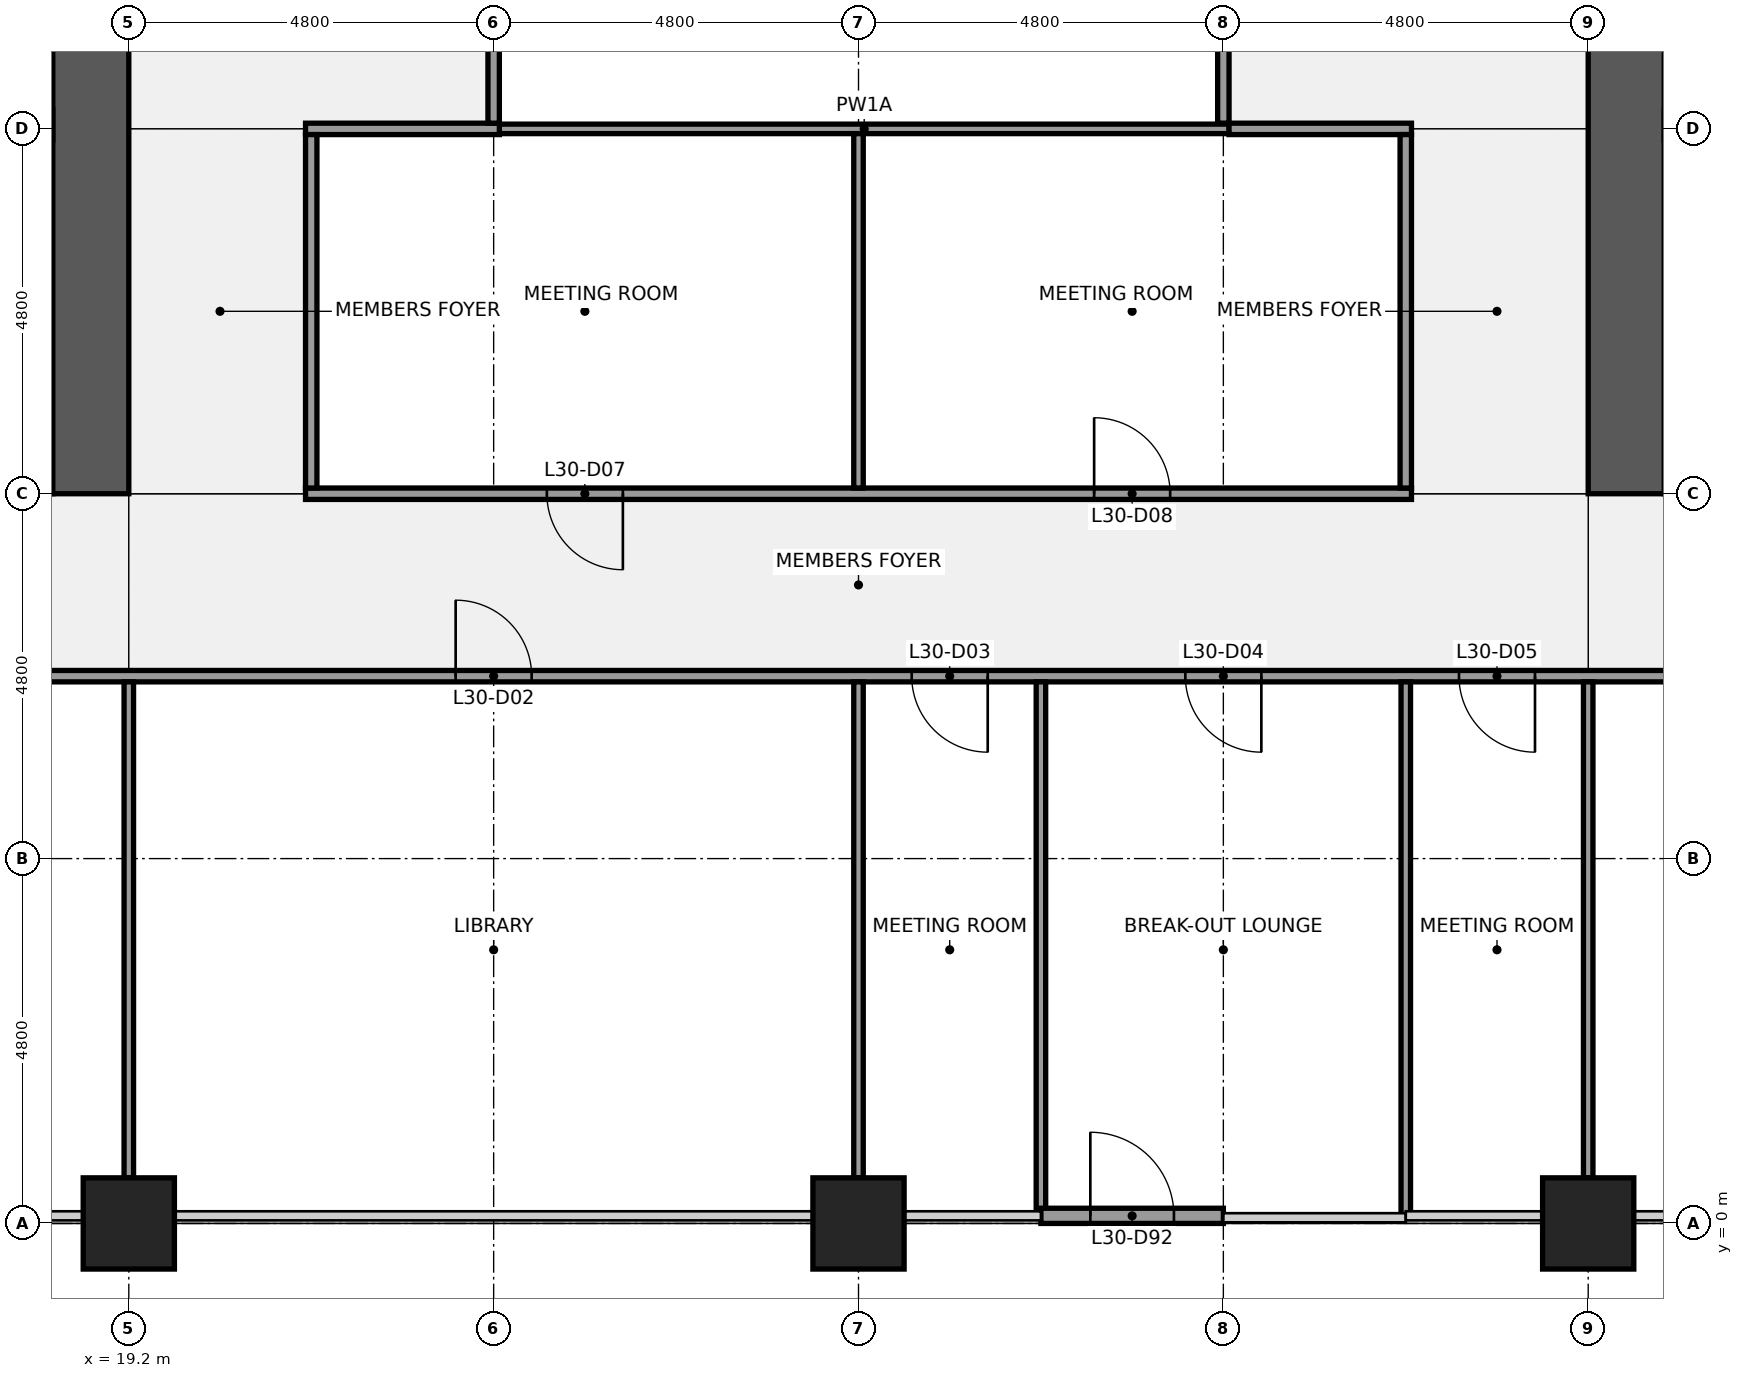
"""IFC4 building model, lengths in metres.
Left out: names, types, materials, properties, quantities, classifications, styles, units other than length and angle.
Written with IfcOpenShell. Run it as: python <this file> out.ifc"""

import sys

from ifc_helpers import new_model, si_unit, direction, frame, frame_2d, origin, origin_2d, place, context, subcontext, project, spatial, rectangle, extrude, element, fill, save


model = new_model("IFC4")
c1 = context("Model", 3, precision=1e-05, world=origin(), true_north=direction((0.0, 1.0)))
c2 = subcontext(c1, "Body", "Model", "MODEL_VIEW")
j1 = project(units=[si_unit("LENGTHUNIT", "METRE"), si_unit("PLANEANGLEUNIT", "RADIAN")], contexts=[c1])
p1 = place(None, origin())
s1 = spatial("IfcSite", under=j1, at=p1, CompositionType="ELEMENT")
p2 = place(p1, origin())
s2 = spatial("IfcBuilding", under=s1, at=p2, CompositionType="ELEMENT")
p3 = place(p2, frame((0.0, 0.0, 140.1)))
s3 = spatial("IfcBuildingStorey", under=s2, at=p3, CompositionType="ELEMENT", Elevation=140.1)
for number, where, z_axis, x_axis in (
    (1, (19.2, 0.0, 0.0), (0.0, 0.0, 1.0), (1.0, 0.0, 0.0)),
    (2, (28.8, 0.0, 0.0), (0.0, 0.0, 1.0), (1.0, 0.0, 0.0)),
    (3, (38.4, 0.0, 0.0), (0.0, 0.0, 1.0), (1.0, 0.0, 0.0)),
):
    element("IfcColumn", number, at=place(p3, frame(where, z_axis=z_axis, x_axis=x_axis)), inside=s3, PredefinedType="COLUMN", context=c2, shape_type="SweptSolid", body=[
        extrude(rectangle(XDim=1.2, YDim=1.2, at=origin_2d()), origin(), (0.0, 0.0, 1.0), 4.0),
    ])
p4 = place(p3, frame((18.2, 10.1, 0.0), z_axis=(0.0, 0.0, 1.0), x_axis=(-1.0, 0.0, 0.0)))
e4 = element("IfcWall", 4, at=p4, inside=s3, PredefinedType="SHEAR", context=c2, shape_type="SweptSolid", body=[
    extrude(rectangle(XDim=8.6, YDim=1.0, at=frame_2d((4.3, 0.0))), origin(), (0.0, 0.0, 1.0), 3.84),
])
p5 = place(p4, frame((0.85, 0.0, 0.0)))
e5 = element("IfcOpeningElement", 5, at=p5, cuts=e4, PredefinedType="OPENING", context=c2, shape_type="SweptSolid", body=[
    extrude(rectangle(XDim=1.1, YDim=2.1, at=frame_2d((0.55, 1.05))), frame((0.0, 0.51, 0.0), z_axis=(0.0, -1.0, 0.0), x_axis=(1.0, 0.0, 0.0)), (0.0, 0.0, 1.0), 1.02),
])
p6 = place(p3, frame((18.7, 38.4, 0.0), z_axis=(0.0, 0.0, 1.0), x_axis=(0.0, -1.0, 0.0)))
e6 = element("IfcWall", 6, at=p6, inside=s3, PredefinedType="SHEAR", context=c2, shape_type="SweptSolid", body=[
    extrude(rectangle(XDim=28.8, YDim=1.0, at=frame_2d((14.4, 0.0))), origin(), (0.0, 0.0, 1.0), 3.84),
])
p7 = place(p6, frame((18.3, 0.0, 0.0)))
e7 = element("IfcOpeningElement", 7, at=p7, cuts=e6, PredefinedType="OPENING", context=c2, shape_type="SweptSolid", body=[
    extrude(rectangle(XDim=1.8, YDim=2.1, at=frame_2d((0.9, 1.05))), frame((0.0, 0.51, 0.0), z_axis=(0.0, -1.0, 0.0), x_axis=(1.0, 0.0, 0.0)), (0.0, 0.0, 1.0), 1.02),
])
p8 = place(p6, frame((8.7, 0.0, 0.0)))
e8 = element("IfcOpeningElement", 8, at=p8, cuts=e6, PredefinedType="OPENING", context=c2, shape_type="SweptSolid", body=[
    extrude(rectangle(XDim=1.8, YDim=2.1, at=frame_2d((0.9, 1.05))), frame((0.0, 0.51, 0.0), z_axis=(0.0, -1.0, 0.0), x_axis=(1.0, 0.0, 0.0)), (0.0, 0.0, 1.0), 1.02),
])
p9 = place(p3, frame((1.0, 14.45, 0.0), z_axis=(0.0, 0.0, 1.0), x_axis=(1.0, 0.0, 0.0)))
e9 = element("IfcWall", 9, at=p9, inside=s3, PredefinedType="SHEAR", context=c2, shape_type="SweptSolid", body=[
    extrude(rectangle(XDim=17.2, YDim=0.4, at=frame_2d((8.6, 0.0))), origin(), (0.0, 0.0, 1.0), 3.84),
])
p10 = place(p3, frame((38.9, 9.6, 0.0), z_axis=(0.0, 0.0, 1.0), x_axis=(0.0, 1.0, 0.0)))
e10 = element("IfcWall", 10, at=p10, inside=s3, PredefinedType="SHEAR", context=c2, shape_type="SweptSolid", body=[
    extrude(rectangle(XDim=28.8, YDim=1.0, at=frame_2d((14.4, 0.0))), origin(), (0.0, 0.0, 1.0), 3.84),
])
p11 = place(p10, frame((8.7, 0.0, 0.0)))
e11 = element("IfcOpeningElement", 11, at=p11, cuts=e10, PredefinedType="OPENING", context=c2, shape_type="SweptSolid", body=[
    extrude(rectangle(XDim=1.8, YDim=2.1, at=frame_2d((0.9, 1.05))), frame((0.0, 0.51, 0.0), z_axis=(0.0, -1.0, 0.0), x_axis=(1.0, 0.0, 0.0)), (0.0, 0.0, 1.0), 1.02),
])
p12 = place(p10, frame((18.3, 0.0, 0.0)))
e12 = element("IfcOpeningElement", 12, at=p12, cuts=e10, PredefinedType="OPENING", context=c2, shape_type="SweptSolid", body=[
    extrude(rectangle(XDim=1.8, YDim=2.1, at=frame_2d((0.9, 1.05))), frame((0.0, 0.51, 0.0), z_axis=(0.0, -1.0, 0.0), x_axis=(1.0, 0.0, 0.0)), (0.0, 0.0, 1.0), 1.02),
])
p13 = place(p3, frame((9.7, 7.2, 0.0), z_axis=(0.0, 0.0, 1.0), x_axis=(1.0, 0.0, 0.0)))
e13 = element("IfcWall", 13, at=p13, inside=s3, PredefinedType="PARTITIONING", context=c2, shape_type="SweptSolid", body=[
    extrude(rectangle(XDim=38.2, YDim=0.15, at=frame_2d((19.1, 0.0))), origin(), (0.0, 0.0, 1.0), 2.936),
])
p14 = place(p13, frame((0.65, 0.0, 0.0)))
e14 = element("IfcOpeningElement", 14, at=p14, cuts=e13, PredefinedType="OPENING", context=c2, shape_type="SweptSolid", body=[
    extrude(rectangle(XDim=1.0, YDim=2.1, at=frame_2d((0.5, 1.05))), frame((0.0, 0.085, 0.0), z_axis=(0.0, -1.0, 0.0), x_axis=(1.0, 0.0, 0.0)), (0.0, 0.0, 1.0), 0.17),
])
p15 = place(p13, frame((13.8, 0.0, 0.0)))
e15 = element("IfcOpeningElement", 15, at=p15, cuts=e13, PredefinedType="OPENING", context=c2, shape_type="SweptSolid", body=[
    extrude(rectangle(XDim=1.0, YDim=2.1, at=frame_2d((0.5, 1.05))), frame((0.0, 0.085, 0.0), z_axis=(0.0, -1.0, 0.0), x_axis=(1.0, 0.0, 0.0)), (0.0, 0.0, 1.0), 0.17),
])
p16 = place(p13, frame((19.8, 0.0, 0.0)))
e16 = element("IfcOpeningElement", 16, at=p16, cuts=e13, PredefinedType="OPENING", context=c2, shape_type="SweptSolid", body=[
    extrude(rectangle(XDim=1.0, YDim=2.1, at=frame_2d((0.5, 1.05))), frame((0.0, 0.085, 0.0), z_axis=(0.0, -1.0, 0.0), x_axis=(1.0, 0.0, 0.0)), (0.0, 0.0, 1.0), 0.17),
])
p17 = place(p13, frame((23.4, 0.0, 0.0)))
e17 = element("IfcOpeningElement", 17, at=p17, cuts=e13, PredefinedType="OPENING", context=c2, shape_type="SweptSolid", body=[
    extrude(rectangle(XDim=1.0, YDim=2.1, at=frame_2d((0.5, 1.05))), frame((0.0, 0.085, 0.0), z_axis=(0.0, -1.0, 0.0), x_axis=(1.0, 0.0, 0.0)), (0.0, 0.0, 1.0), 0.17),
])
p18 = place(p13, frame((27.0, 0.0, 0.0)))
e18 = element("IfcOpeningElement", 18, at=p18, cuts=e13, PredefinedType="OPENING", context=c2, shape_type="SweptSolid", body=[
    extrude(rectangle(XDim=1.0, YDim=2.1, at=frame_2d((0.5, 1.05))), frame((0.0, 0.085, 0.0), z_axis=(0.0, -1.0, 0.0), x_axis=(1.0, 0.0, 0.0)), (0.0, 0.0, 1.0), 0.17),
])
p19 = place(p13, frame((32.95, 0.0, 0.0)))
e19 = element("IfcOpeningElement", 19, at=p19, cuts=e13, PredefinedType="OPENING", context=c2, shape_type="SweptSolid", body=[
    extrude(rectangle(XDim=1.0, YDim=2.1, at=frame_2d((0.5, 1.05))), frame((0.0, 0.085, 0.0), z_axis=(0.0, -1.0, 0.0), x_axis=(1.0, 0.0, 0.0)), (0.0, 0.0, 1.0), 0.17),
])
p20 = place(p3, frame((21.525, 9.6, 0.0), z_axis=(0.0, 0.0, 1.0), x_axis=(1.0, 0.0, 0.0)))
e20 = element("IfcWall", 20, at=p20, inside=s3, PredefinedType="PARTITIONING", context=c2, shape_type="SweptSolid", body=[
    extrude(rectangle(XDim=14.55, YDim=0.15, at=frame_2d((7.275, 0.0))), origin(), (0.0, 0.0, 1.0), 2.936),
])
p21 = place(p20, frame((3.175, 0.0, 0.0)))
e21 = element("IfcOpeningElement", 21, at=p21, cuts=e20, PredefinedType="OPENING", context=c2, shape_type="SweptSolid", body=[
    extrude(rectangle(XDim=1.0, YDim=2.1, at=frame_2d((0.5, 1.05))), frame((0.0, 0.085, 0.0), z_axis=(0.0, -1.0, 0.0), x_axis=(1.0, 0.0, 0.0)), (0.0, 0.0, 1.0), 0.17),
])
p22 = place(p20, frame((10.375, 0.0, 0.0)))
e22 = element("IfcOpeningElement", 22, at=p22, cuts=e20, PredefinedType="OPENING", context=c2, shape_type="SweptSolid", body=[
    extrude(rectangle(XDim=1.0, YDim=2.1, at=frame_2d((0.5, 1.05))), frame((0.0, 0.085, 0.0), z_axis=(0.0, -1.0, 0.0), x_axis=(1.0, 0.0, 0.0)), (0.0, 0.0, 1.0), 0.17),
])
p23 = place(p3, frame((24.075, 14.4, 0.0), z_axis=(0.0, 0.0, 1.0), x_axis=(1.0, 0.0, 0.0)))
e23 = element("IfcWall", 23, at=p23, inside=s3, PredefinedType="PARTITIONING", context=c2, shape_type="SweptSolid", body=[
    extrude(rectangle(XDim=9.6, YDim=0.125, at=frame_2d((4.8, 0.0))), origin(), (0.0, 0.0, 1.0), 2.936),
])
p24 = place(p3, frame((21.525, 14.4, 0.0), z_axis=(0.0, 0.0, 1.0), x_axis=(1.0, 0.0, 0.0)))
e24 = element("IfcWall", 24, at=p24, inside=s3, PredefinedType="PARTITIONING", context=c2, shape_type="SweptSolid", body=[
    extrude(rectangle(XDim=2.55, YDim=0.15, at=frame_2d((1.275, 0.0))), origin(), (0.0, 0.0, 1.0), 2.936),
])
p25 = place(p3, frame((33.675, 14.4, 0.0), z_axis=(0.0, 0.0, 1.0), x_axis=(1.0, 0.0, 0.0)))
e25 = element("IfcWall", 25, at=p25, inside=s3, PredefinedType="PARTITIONING", context=c2, shape_type="SweptSolid", body=[
    extrude(rectangle(XDim=2.4, YDim=0.15, at=frame_2d((1.2, 0.0))), origin(), (0.0, 0.0, 1.0), 2.936),
])
p26 = place(p3, frame((19.2, 0.6, 0.0), z_axis=(0.0, 0.0, 1.0), x_axis=(0.0, 1.0, 0.0)))
e26 = element("IfcWall", 26, at=p26, inside=s3, PredefinedType="PARTITIONING", context=c2, shape_type="SweptSolid", body=[
    extrude(rectangle(XDim=6.525, YDim=0.125, at=frame_2d((3.262, 0.0))), origin(), (0.0, 0.0, 1.0), 2.936),
])
p27 = place(p3, frame((21.6, 9.675, 0.0), z_axis=(0.0, 0.0, 1.0), x_axis=(0.0, 1.0, 0.0)))
e27 = element("IfcWall", 27, at=p27, inside=s3, PredefinedType="PARTITIONING", context=c2, shape_type="SweptSolid", body=[
    extrude(rectangle(XDim=4.65, YDim=0.15, at=frame_2d((2.325, 0.0))), origin(), (0.0, 0.0, 1.0), 2.936),
])
p28 = place(p3, frame((24.0, 14.475, 0.0), z_axis=(0.0, 0.0, 1.0), x_axis=(0.0, 1.0, 0.0)))
e28 = element("IfcWall", 28, at=p28, inside=s3, PredefinedType="PARTITIONING", context=c2, shape_type="SweptSolid", body=[
    extrude(rectangle(XDim=10.65, YDim=0.15, at=frame_2d((5.325, 0.0))), origin(), (0.0, 0.0, 1.0), 2.936),
])
p29 = place(p28, frame((4.825, 0.0, 0.0)))
e29 = element("IfcOpeningElement", 29, at=p29, cuts=e28, PredefinedType="OPENING", context=c2, shape_type="SweptSolid", body=[
    extrude(rectangle(XDim=1.0, YDim=2.1, at=frame_2d((0.5, 1.05))), frame((0.0, 0.085, 0.0), z_axis=(0.0, -1.0, 0.0), x_axis=(1.0, 0.0, 0.0)), (0.0, 0.0, 1.0), 0.17),
])
p30 = place(p3, frame((28.8, 0.6, 0.0), z_axis=(0.0, 0.0, 1.0), x_axis=(0.0, 1.0, 0.0)))
e30 = element("IfcWall", 30, at=p30, inside=s3, PredefinedType="PARTITIONING", context=c2, shape_type="SweptSolid", body=[
    extrude(rectangle(XDim=6.525, YDim=0.125, at=frame_2d((3.262, 0.0))), origin(), (0.0, 0.0, 1.0), 2.936),
])
p31 = place(p3, frame((28.8, 9.675, 0.0), z_axis=(0.0, 0.0, 1.0), x_axis=(0.0, 1.0, 0.0)))
e31 = element("IfcWall", 31, at=p31, inside=s3, PredefinedType="PARTITIONING", context=c2, shape_type="SweptSolid", body=[
    extrude(rectangle(XDim=4.662, YDim=0.125, at=frame_2d((2.331, 0.0))), origin(), (0.0, 0.0, 1.0), 2.936),
])
p32 = place(p3, frame((31.2, 0.1, 0.0), z_axis=(0.0, 0.0, 1.0), x_axis=(0.0, 1.0, 0.0)))
e32 = element("IfcWall", 32, at=p32, inside=s3, PredefinedType="PARTITIONING", context=c2, shape_type="SweptSolid", body=[
    extrude(rectangle(XDim=7.025, YDim=0.125, at=frame_2d((3.512, 0.0))), origin(), (0.0, 0.0, 1.0), 2.936),
])
p33 = place(p3, frame((33.6, 14.475, 0.0), z_axis=(0.0, 0.0, 1.0), x_axis=(0.0, 1.0, 0.0)))
e33 = element("IfcWall", 33, at=p33, inside=s3, PredefinedType="PARTITIONING", context=c2, shape_type="SweptSolid", body=[
    extrude(rectangle(XDim=10.65, YDim=0.15, at=frame_2d((5.325, 0.0))), origin(), (0.0, 0.0, 1.0), 2.936),
])
p34 = place(p3, frame((36.0, 0.1, 0.0), z_axis=(0.0, 0.0, 1.0), x_axis=(0.0, 1.0, 0.0)))
e34 = element("IfcWall", 34, at=p34, inside=s3, PredefinedType="PARTITIONING", context=c2, shape_type="SweptSolid", body=[
    extrude(rectangle(XDim=7.025, YDim=0.125, at=frame_2d((3.512, 0.0))), origin(), (0.0, 0.0, 1.0), 2.936),
])
p35 = place(p3, frame((36.0, 9.675, 0.0), z_axis=(0.0, 0.0, 1.0), x_axis=(0.0, 1.0, 0.0)))
e35 = element("IfcWall", 35, at=p35, inside=s3, PredefinedType="PARTITIONING", context=c2, shape_type="SweptSolid", body=[
    extrude(rectangle(XDim=4.65, YDim=0.15, at=frame_2d((2.325, 0.0))), origin(), (0.0, 0.0, 1.0), 2.936),
])
p36 = place(p3, frame((38.4, 0.6, 0.0), z_axis=(0.0, 0.0, 1.0), x_axis=(0.0, 1.0, 0.0)))
e36 = element("IfcWall", 36, at=p36, inside=s3, PredefinedType="PARTITIONING", context=c2, shape_type="SweptSolid", body=[
    extrude(rectangle(XDim=6.525, YDim=0.125, at=frame_2d((3.262, 0.0))), origin(), (0.0, 0.0, 1.0), 2.936),
])
p37 = place(p3, frame((31.2, 0.1, 0.0), z_axis=(0.0, 0.0, 1.0), x_axis=(1.0, 0.0, 0.0)))
e37 = element("IfcWall", 37, at=p37, inside=s3, PredefinedType="SOLIDWALL", context=c2, shape_type="SweptSolid", body=[
    extrude(rectangle(XDim=2.4, YDim=0.2, at=frame_2d((1.2, 0.0))), origin(), (0.0, 0.0, 1.0), 3.314),
])
p38 = place(p37, frame((0.65, 0.0, 0.0)))
e38 = element("IfcOpeningElement", 38, at=p38, cuts=e37, PredefinedType="OPENING", context=c2, shape_type="SweptSolid", body=[
    extrude(rectangle(XDim=1.1, YDim=2.1, at=frame_2d((0.55, 1.05))), frame((0.0, 0.11, 0.0), z_axis=(0.0, -1.0, 0.0), x_axis=(1.0, 0.0, 0.0)), (0.0, 0.0, 1.0), 0.22),
])
for number, where, z_axis, x_axis in (
    (39, (19.2, -1.05, 0.0), (0.0, 0.0, 1.0), (1.0, 0.0, 0.0)),
    (40, (38.4, -1.05, 0.0), (0.0, 0.0, 1.0), (1.0, 0.0, 0.0)),
):
    element("IfcColumn", number, at=place(p3, frame(where, z_axis=z_axis, x_axis=x_axis)), inside=s3, PredefinedType="PILASTER", context=c2, shape_type="SweptSolid", body=[
        extrude(rectangle(XDim=3.6, YDim=0.9, at=origin_2d()), origin(), (0.0, 0.0, 1.0), 4.0),
    ])
p39 = place(p15, origin())
e41 = element("IfcDoor", 41, at=p39, inside=s3, OperationType="SINGLE_SWING_LEFT", PredefinedType="DOOR", context=c2, shape_type="SweptSolid", body=[
    extrude(rectangle(XDim=1.0, YDim=2.1, at=frame_2d((0.5, 1.05))), frame((0.0, 0.025, 0.0), z_axis=(0.0, -1.0, 0.0), x_axis=(1.0, 0.0, 0.0)), (0.0, 0.0, 1.0), 0.05),
])
fill(e15, e41)
p40 = place(p16, origin())
e42 = element("IfcDoor", 42, at=p40, inside=s3, OperationType="SINGLE_SWING_RIGHT", PredefinedType="DOOR", context=c2, shape_type="SweptSolid", body=[
    extrude(rectangle(XDim=1.0, YDim=2.1, at=frame_2d((0.5, 1.05))), frame((0.0, 0.025, 0.0), z_axis=(0.0, -1.0, 0.0), x_axis=(1.0, 0.0, 0.0)), (0.0, 0.0, 1.0), 0.05),
])
fill(e16, e42)
p41 = place(p17, origin())
e43 = element("IfcDoor", 43, at=p41, inside=s3, OperationType="SINGLE_SWING_RIGHT", PredefinedType="DOOR", context=c2, shape_type="SweptSolid", body=[
    extrude(rectangle(XDim=1.0, YDim=2.1, at=frame_2d((0.5, 1.05))), frame((0.0, 0.025, 0.0), z_axis=(0.0, -1.0, 0.0), x_axis=(1.0, 0.0, 0.0)), (0.0, 0.0, 1.0), 0.05),
])
fill(e17, e43)
p42 = place(p18, origin())
e44 = element("IfcDoor", 44, at=p42, inside=s3, OperationType="SINGLE_SWING_RIGHT", PredefinedType="DOOR", context=c2, shape_type="SweptSolid", body=[
    extrude(rectangle(XDim=1.0, YDim=2.1, at=frame_2d((0.5, 1.05))), frame((0.0, 0.025, 0.0), z_axis=(0.0, -1.0, 0.0), x_axis=(1.0, 0.0, 0.0)), (0.0, 0.0, 1.0), 0.05),
])
fill(e18, e44)
p43 = place(p21, origin())
e45 = element("IfcDoor", 45, at=p43, inside=s3, OperationType="SINGLE_SWING_RIGHT", PredefinedType="DOOR", context=c2, shape_type="SweptSolid", body=[
    extrude(rectangle(XDim=1.0, YDim=2.1, at=frame_2d((0.5, 1.05))), frame((0.0, 0.025, 0.0), z_axis=(0.0, -1.0, 0.0), x_axis=(1.0, 0.0, 0.0)), (0.0, 0.0, 1.0), 0.05),
])
fill(e21, e45)
p44 = place(p22, origin())
e46 = element("IfcDoor", 46, at=p44, inside=s3, OperationType="SINGLE_SWING_LEFT", PredefinedType="DOOR", context=c2, shape_type="SweptSolid", body=[
    extrude(rectangle(XDim=1.0, YDim=2.1, at=frame_2d((0.5, 1.05))), frame((0.0, 0.025, 0.0), z_axis=(0.0, -1.0, 0.0), x_axis=(1.0, 0.0, 0.0)), (0.0, 0.0, 1.0), 0.05),
])
fill(e22, e46)
p45 = place(p38, origin())
e47 = element("IfcDoor", 47, at=p45, inside=s3, OperationType="SINGLE_SWING_LEFT", PredefinedType="DOOR", context=c2, shape_type="SweptSolid", body=[
    extrude(rectangle(XDim=1.1, YDim=2.1, at=frame_2d((0.55, 1.05))), frame((0.0, 0.025, 0.0), z_axis=(0.0, -1.0, 0.0), x_axis=(1.0, 0.0, 0.0)), (0.0, 0.0, 1.0), 0.05),
])
fill(e38, e47)
save(model, sys.argv[1])
